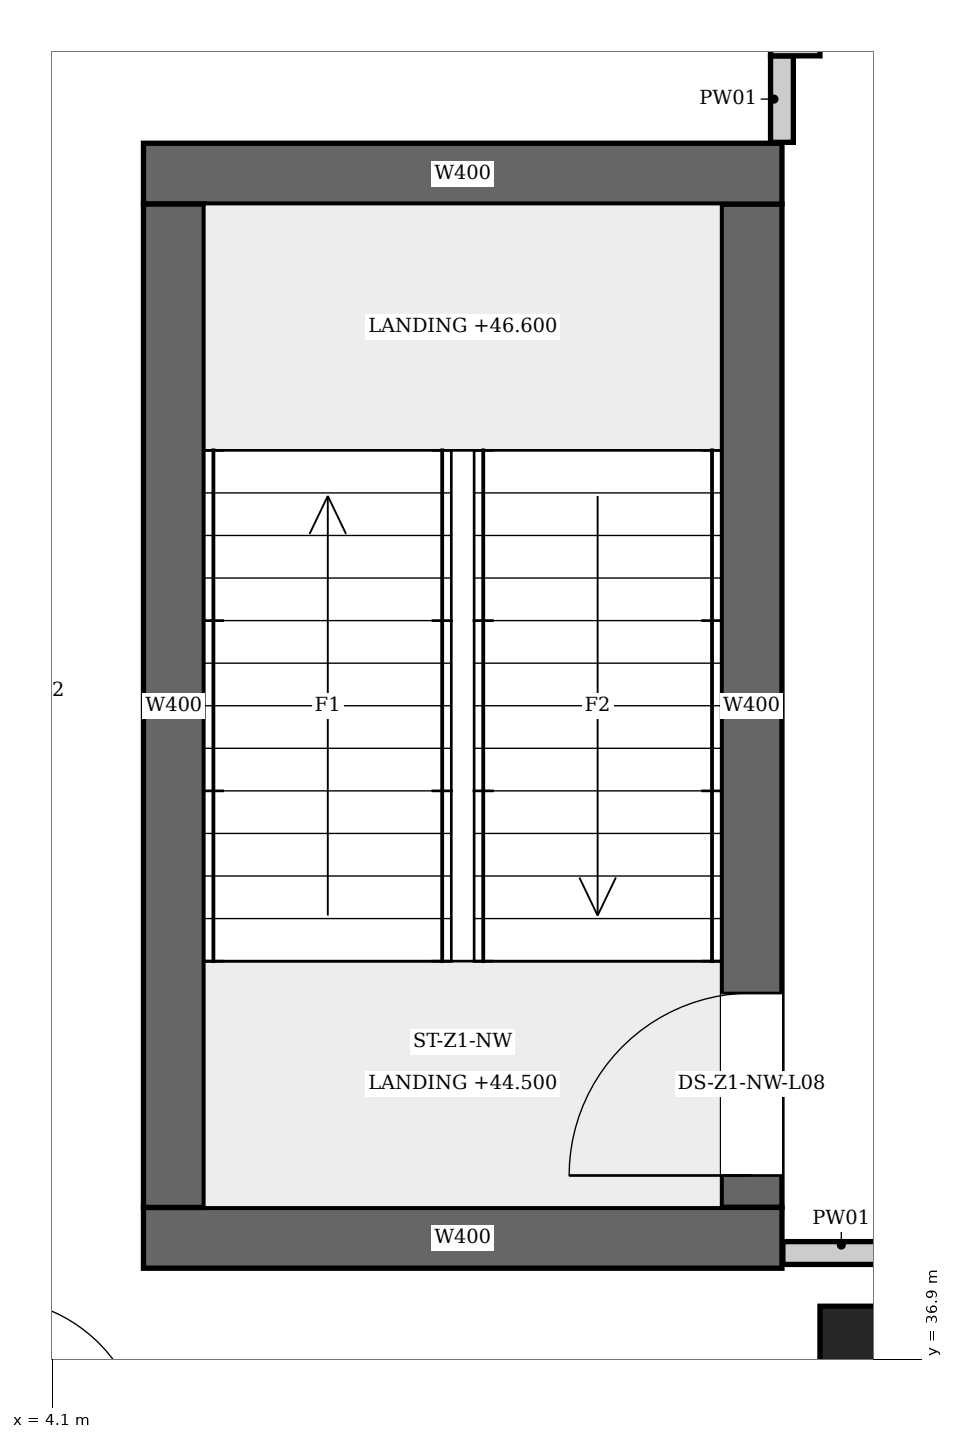
"""IFC4 building model, lengths in metres.
Left out: names, types, materials, properties, quantities, classifications, styles, units other than length and angle.
Written with IfcOpenShell. Run it as: python <this file> out.ifc"""

import sys

from ifc_helpers import new_model, si_unit, direction, frame, frame_2d, origin, origin_2d, place, context, subcontext, project, spatial, rectangle, extrude, element, fill, save


model = new_model("IFC4")
c1 = context("Model", 3, precision=1e-05, world=origin(), true_north=direction((0.0, 1.0)))
c2 = subcontext(c1, "Body", "Model", "MODEL_VIEW")
j1 = project(units=[si_unit("LENGTHUNIT", "METRE"), si_unit("PLANEANGLEUNIT", "RADIAN")], contexts=[c1])
p1 = place(None, origin())
s1 = spatial("IfcSite", under=j1, at=p1, CompositionType="ELEMENT")
p2 = place(p1, origin())
s2 = spatial("IfcBuilding", under=s1, at=p2, CompositionType="ELEMENT")
p3 = place(p2, frame((0.0, 0.0, 44.5)))
s3 = spatial("IfcBuildingStorey", under=s2, at=p3, CompositionType="ELEMENT", Elevation=44.5)
for number, where, z_axis, x_axis in (
    (1, (4.7, 37.7, 0.0), (0.0, 0.0, 1.0), (1.0, 0.0, 0.0)),
    (2, (4.7, 44.7, 0.0), (0.0, 0.0, 1.0), (1.0, 0.0, 0.0)),
):
    element("IfcWall", number, at=place(p3, frame(where, z_axis=z_axis, x_axis=x_axis)), inside=s3, PredefinedType="SHEAR", context=c2, shape_type="SweptSolid", body=[
        extrude(rectangle(XDim=4.2, YDim=0.4, at=frame_2d((2.1, 0.0))), origin(), (0.0, 0.0, 1.0), 4.2),
    ])
p4 = place(p3, frame((4.9, 37.9, 0.0), z_axis=(0.0, 0.0, 1.0), x_axis=(0.0, 1.0, 0.0)))
e3 = element("IfcWall", 3, at=p4, inside=s3, PredefinedType="SHEAR", context=c2, shape_type="SweptSolid", body=[
    extrude(rectangle(XDim=6.6, YDim=0.4, at=frame_2d((3.3, 0.0))), origin(), (0.0, 0.0, 1.0), 4.2),
])
p5 = place(p3, frame((8.7, 37.9, 0.0), z_axis=(0.0, 0.0, 1.0), x_axis=(0.0, 1.0, 0.0)))
e4 = element("IfcWall", 4, at=p5, inside=s3, PredefinedType="SHEAR", context=c2, shape_type="SweptSolid", body=[
    extrude(rectangle(XDim=6.6, YDim=0.4, at=frame_2d((3.3, 0.0))), origin(), (0.0, 0.0, 1.0), 4.2),
])
p6 = place(p5, frame((0.21, 0.0, 0.0)))
e5 = element("IfcOpeningElement", 5, at=p6, cuts=e4, PredefinedType="OPENING", context=c2, shape_type="SweptSolid", body=[
    extrude(rectangle(XDim=1.2, YDim=2.1, at=frame_2d((0.6, 1.05))), frame((0.0, 0.21, 0.0), z_axis=(0.0, -1.0, 0.0), x_axis=(1.0, 0.0, 0.0)), (0.0, 0.0, 1.0), 0.42),
])
p7 = place(p3, frame((9.6, 36.8, 0.0), z_axis=(0.0, 0.0, 1.0), x_axis=(1.0, 0.0, 0.0)))
e6 = element("IfcColumn", 6, at=p7, inside=s3, PredefinedType="COLUMN", context=c2, shape_type="SweptSolid", body=[
    extrude(rectangle(XDim=0.9, YDim=0.9, at=origin_2d()), origin(), (0.0, 0.0, 1.0), 4.2),
])
p8 = place(p3, frame((8.9, 44.906, 0.0), z_axis=(0.0, 0.0, 1.0), x_axis=(0.0, 1.0, 0.0)))
e7 = element("IfcWall", 7, at=p8, inside=s3, PredefinedType="PARTITIONING", context=c2, shape_type="SweptSolid", body=[
    extrude(rectangle(XDim=0.569, YDim=0.15, at=frame_2d((0.285, 0.0))), origin(), (0.0, 0.0, 1.0), 3.9),
])
p9 = place(p3, frame((8.825, 45.55, 0.0), z_axis=(0.0, 0.0, 1.0), x_axis=(1.0, 0.0, 0.0)))
e8 = element("IfcWall", 8, at=p9, inside=s3, PredefinedType="PARTITIONING", context=c2, shape_type="SweptSolid", body=[
    extrude(rectangle(XDim=0.325, YDim=0.15, at=frame_2d((0.163, 0.0))), origin(), (0.0, 0.0, 1.0), 3.9),
])
p10 = place(p3, frame((8.906, 37.6, 0.0), z_axis=(0.0, 0.0, 1.0), x_axis=(1.0, 0.0, 0.0)))
e9 = element("IfcWall", 9, at=p10, inside=s3, PredefinedType="PARTITIONING", context=c2, shape_type="SweptSolid", body=[
    extrude(rectangle(XDim=0.769, YDim=0.15, at=frame_2d((0.385, 0.0))), origin(), (0.0, 0.0, 1.0), 3.9),
])
p11 = place(p6, origin())
e10 = element("IfcDoor", 10, at=p11, inside=s3, OperationType="SINGLE_SWING_RIGHT", PredefinedType="DOOR", context=c2, shape_type="SweptSolid", body=[
    extrude(rectangle(XDim=1.2, YDim=2.1, at=frame_2d((0.6, 1.05))), frame((0.0, 0.025, 0.0), z_axis=(0.0, -1.0, 0.0), x_axis=(1.0, 0.0, 0.0)), (0.0, 0.0, 1.0), 0.05),
])
fill(e5, e10)
save(model, sys.argv[1])
